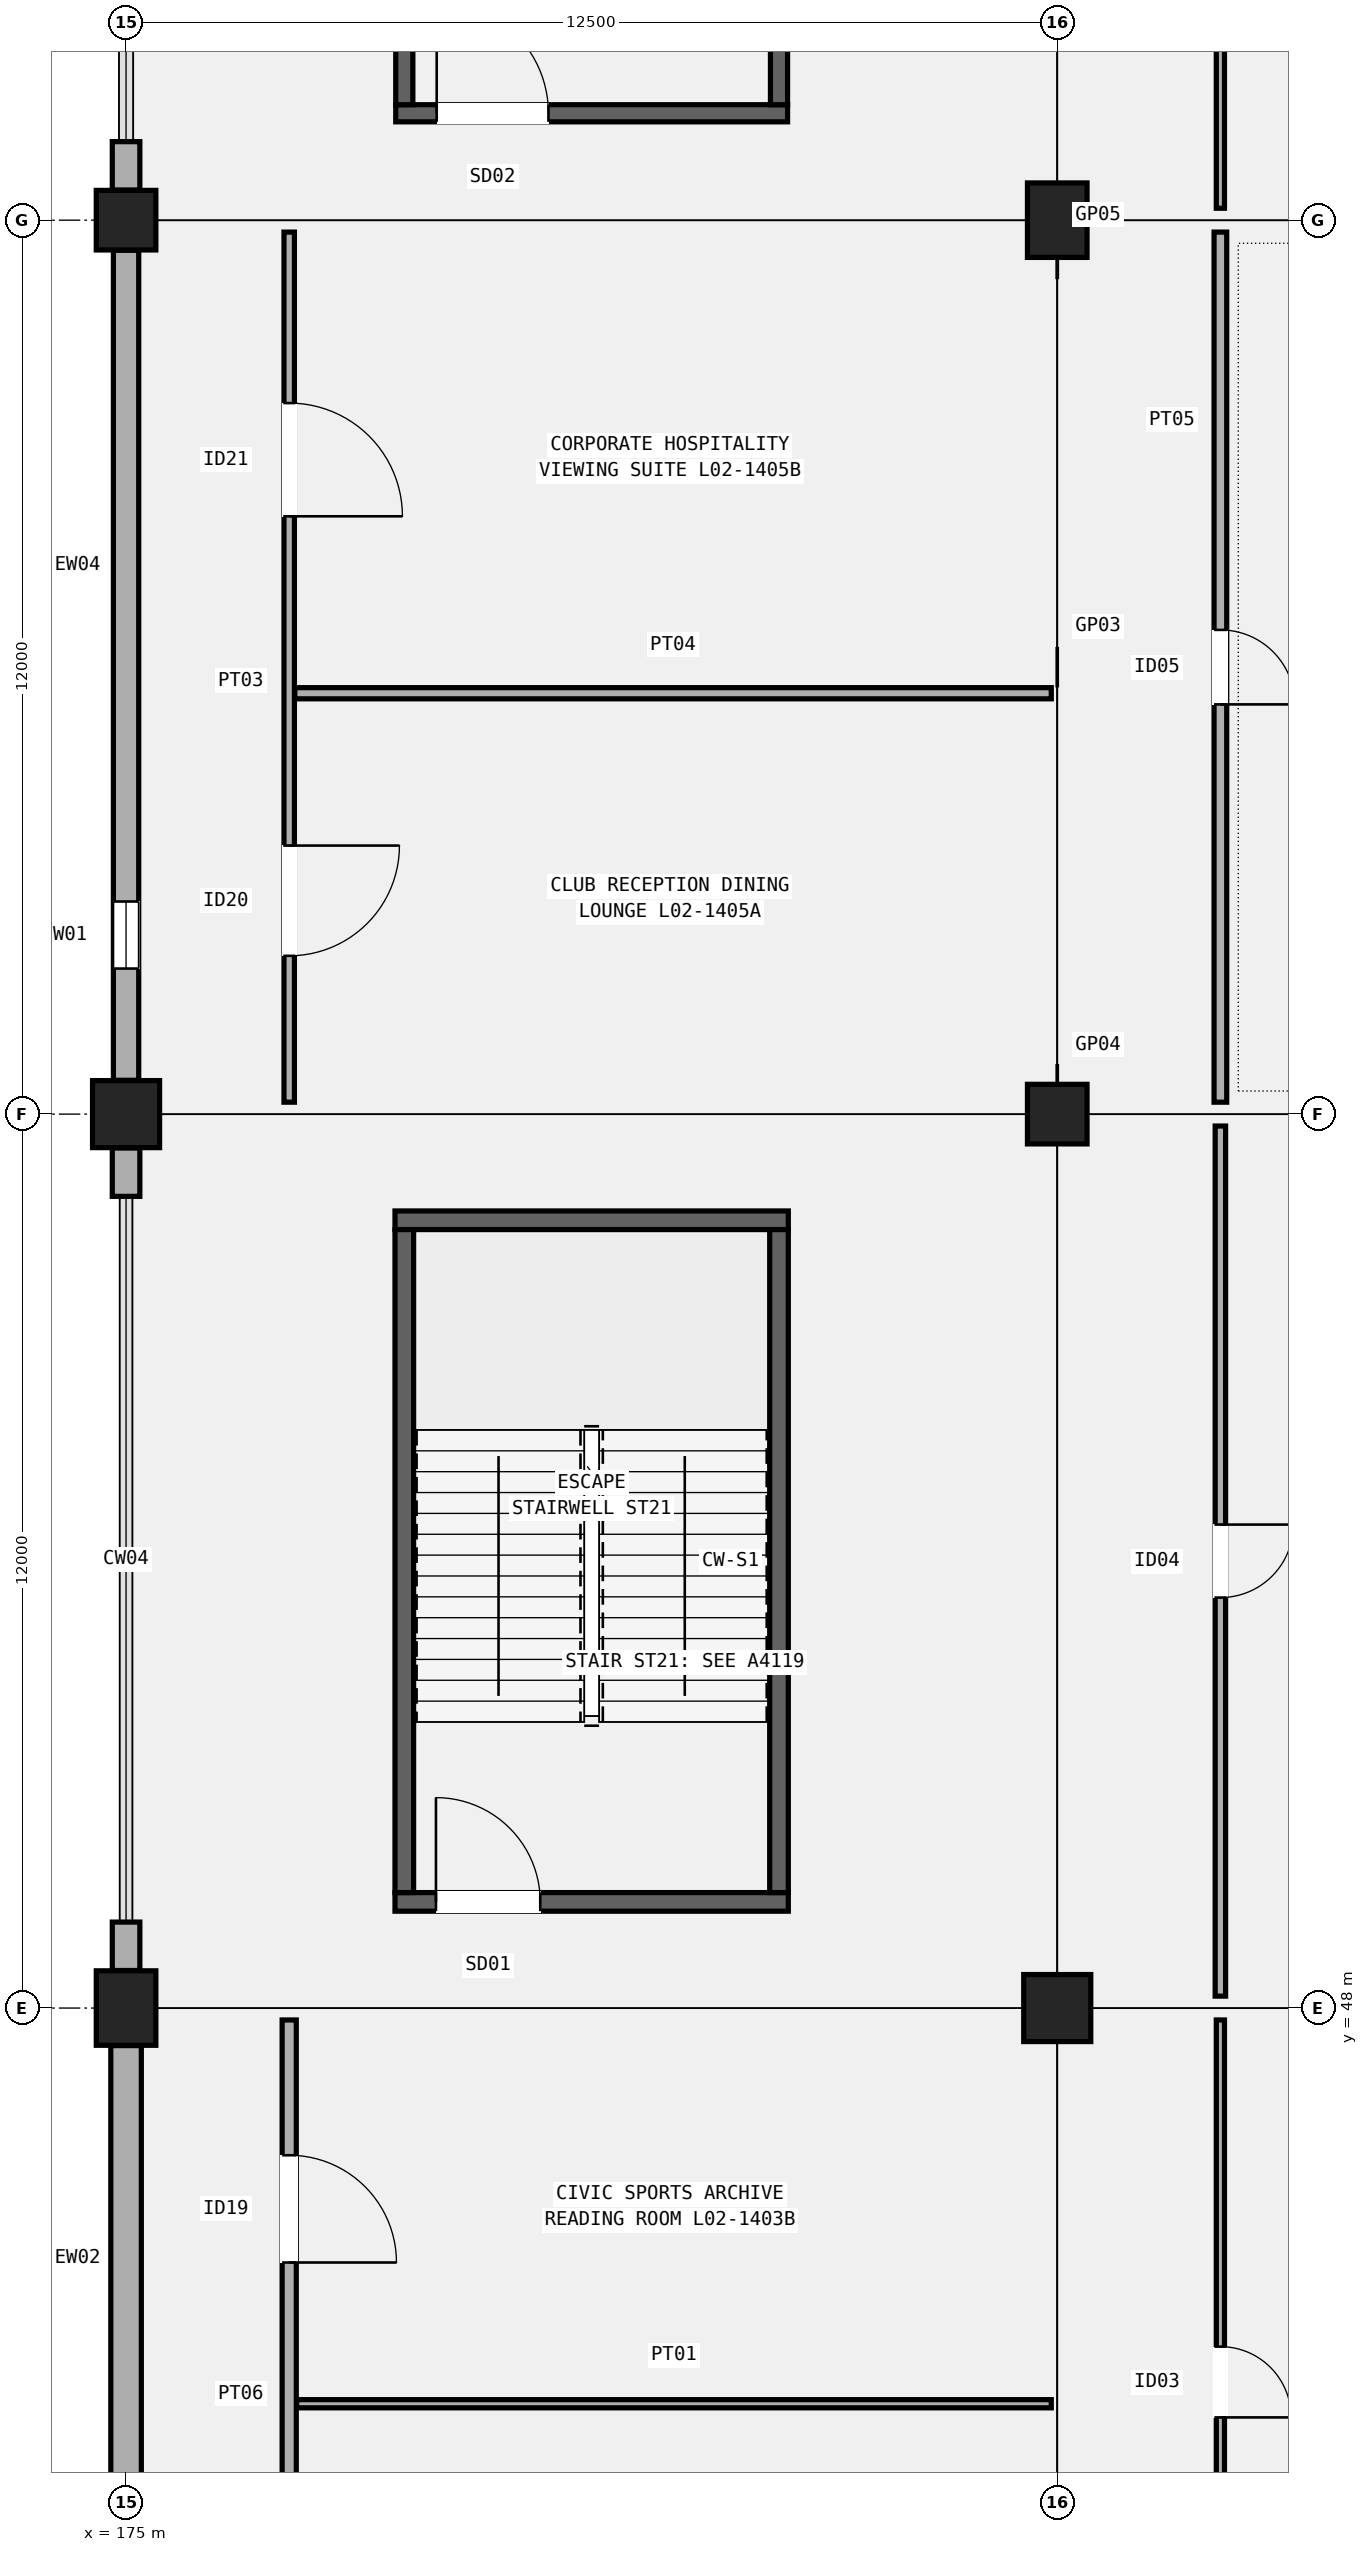
"""IFC4 building model, lengths in metres.
Left out: names, types, materials, properties, quantities, classifications, styles, units other than length and angle.
Written with IfcOpenShell. Run it as: python <this file> out.ifc"""

import sys

from ifc_helpers import new_model, si_unit, direction, frame, frame_2d, origin, origin_2d, place, context, subcontext, project, spatial, rectangle, extrude, element, fill, save


model = new_model("IFC4")
c1 = context("Model", 3, precision=1e-05, world=origin(), true_north=direction((0.0, 1.0)))
c2 = subcontext(c1, "Body", "Model", "MODEL_VIEW")
j1 = project(units=[si_unit("LENGTHUNIT", "METRE"), si_unit("PLANEANGLEUNIT", "RADIAN")], contexts=[c1])
p1 = place(None, origin())
s1 = spatial("IfcSite", under=j1, at=p1, CompositionType="ELEMENT")
p2 = place(p1, origin())
s2 = spatial("IfcBuilding", under=s1, at=p2, CompositionType="ELEMENT")
p3 = place(p2, frame((0.0, 0.0, 10.2)))
s3 = spatial("IfcBuildingStorey", under=s2, at=p3, CompositionType="ELEMENT", Elevation=10.2)
p4 = place(p3, frame((175.0, 48.0, 0.0), z_axis=(0.0, 0.0, 1.0), x_axis=(1.0, 0.0, 0.0)))
e1 = element("IfcColumn", 1, at=p4, inside=s3, PredefinedType="COLUMN", context=c2, shape_type="SweptSolid", body=[
    extrude(rectangle(XDim=0.8, YDim=1.0, at=origin_2d()), origin(), (0.0, 0.0, 1.0), 5.1),
])
p5 = place(p3, frame((175.0, 60.0, 0.0), z_axis=(0.0, 0.0, 1.0), x_axis=(1.0, 0.0, 0.0)))
e2 = element("IfcColumn", 2, at=p5, inside=s3, PredefinedType="COLUMN", context=c2, shape_type="SweptSolid", body=[
    extrude(rectangle(XDim=0.9, YDim=0.9, at=origin_2d()), origin(), (0.0, 0.0, 1.0), 5.1),
])
p6 = place(p3, frame((175.0, 72.0, 0.0), z_axis=(0.0, 0.0, 1.0), x_axis=(1.0, 0.0, 0.0)))
e3 = element("IfcColumn", 3, at=p6, inside=s3, PredefinedType="COLUMN", context=c2, shape_type="SweptSolid", body=[
    extrude(rectangle(XDim=0.8, YDim=0.8, at=origin_2d()), origin(), (0.0, 0.0, 1.0), 5.1),
])
p7 = place(p3, frame((187.5, 48.0, 0.0), z_axis=(0.0, 0.0, 1.0), x_axis=(1.0, 0.0, 0.0)))
e4 = element("IfcColumn", 4, at=p7, inside=s3, PredefinedType="COLUMN", context=c2, shape_type="SweptSolid", body=[
    extrude(rectangle(XDim=0.9, YDim=0.9, at=origin_2d()), origin(), (0.0, 0.0, 1.0), 5.1),
])
p8 = place(p3, frame((187.5, 60.0, 0.0), z_axis=(0.0, 0.0, 1.0), x_axis=(1.0, 0.0, 0.0)))
e5 = element("IfcColumn", 5, at=p8, inside=s3, PredefinedType="COLUMN", context=c2, shape_type="SweptSolid", body=[
    extrude(rectangle(XDim=0.8, YDim=0.8, at=origin_2d()), origin(), (0.0, 0.0, 1.0), 5.1),
])
p9 = place(p3, frame((187.5, 72.0, 0.0), z_axis=(0.0, 0.0, 1.0), x_axis=(1.0, 0.0, 0.0)))
e6 = element("IfcColumn", 6, at=p9, inside=s3, PredefinedType="COLUMN", context=c2, shape_type="SweptSolid", body=[
    extrude(rectangle(XDim=0.8, YDim=1.0, at=origin_2d()), origin(), (0.0, 0.0, 1.0), 5.1),
])
p10 = place(p3, frame((175.0, 36.404, 0.0), z_axis=(0.0, 0.0, 1.0), x_axis=(0.0, 1.0, 0.0)))
e7 = element("IfcWall", 7, at=p10, inside=s3, PredefinedType="SOLIDWALL", context=c2, shape_type="SweptSolid", body=[
    extrude(rectangle(XDim=11.092, YDim=0.41, at=frame_2d((5.546, 0.0))), origin(), (0.0, 0.0, 1.0), 4.232),
])
p11 = place(p10, frame((1.5, 0.0, 0.95)))
e8 = element("IfcOpeningElement", 8, at=p11, cuts=e7, PredefinedType="OPENING", context=c2, shape_type="SweptSolid", body=[
    extrude(rectangle(XDim=3.6, YDim=2.15, at=frame_2d((1.8, 1.075))), frame((0.0, 0.215, 0.0), z_axis=(0.0, -1.0, 0.0), x_axis=(1.0, 0.0, 0.0)), (0.0, 0.0, 1.0), 0.43),
])
p12 = place(p3, frame((175.0, 48.504, 0.0), z_axis=(0.0, 0.0, 1.0), x_axis=(0.0, 1.0, 0.0)))
e9 = element("IfcWall", 9, at=p12, inside=s3, PredefinedType="SOLIDWALL", context=c2, shape_type="SweptSolid", body=[
    extrude(rectangle(XDim=0.65, YDim=0.37, at=frame_2d((0.325, 0.0))), origin(), (0.0, 0.0, 1.0), 4.02),
])
p13 = place(p3, frame((175.0, 58.896, 0.0), z_axis=(0.0, 0.0, 1.0), x_axis=(0.0, 1.0, 0.0)))
e10 = element("IfcWall", 10, at=p13, inside=s3, PredefinedType="SOLIDWALL", context=c2, shape_type="SweptSolid", body=[
    extrude(rectangle(XDim=0.65, YDim=0.37, at=frame_2d((0.325, 0.0))), origin(), (0.0, 0.0, 1.0), 4.02),
])
p14 = place(p3, frame((175.0, 60.454, 0.0), z_axis=(0.0, 0.0, 1.0), x_axis=(0.0, 1.0, 0.0)))
e11 = element("IfcWall", 11, at=p14, inside=s3, PredefinedType="SOLIDWALL", context=c2, shape_type="SweptSolid", body=[
    extrude(rectangle(XDim=11.142, YDim=0.34, at=frame_2d((5.571, 0.0))), origin(), (0.0, 0.0, 1.0), 4.12),
])
p15 = place(p14, frame((1.5, 0.0, 0.95)))
e12 = element("IfcOpeningElement", 12, at=p15, cuts=e11, PredefinedType="OPENING", context=c2, shape_type="SweptSolid", body=[
    extrude(rectangle(XDim=0.9, YDim=2.1, at=frame_2d((0.45, 1.05))), frame((0.0, 0.18, 0.0), z_axis=(0.0, -1.0, 0.0), x_axis=(1.0, 0.0, 0.0)), (0.0, 0.0, 1.0), 0.36),
])
p16 = place(p3, frame((175.0, 72.404, 0.0), z_axis=(0.0, 0.0, 1.0), x_axis=(0.0, 1.0, 0.0)))
e13 = element("IfcWall", 13, at=p16, inside=s3, PredefinedType="SOLIDWALL", context=c2, shape_type="SweptSolid", body=[
    extrude(rectangle(XDim=0.65, YDim=0.37, at=frame_2d((0.325, 0.0))), origin(), (0.0, 0.0, 1.0), 4.232),
])
p17 = place(p3, frame((178.61, 49.425, 0.0), z_axis=(0.0, 0.0, 1.0), x_axis=(1.0, 0.0, 0.0)))
e14 = element("IfcWall", 14, at=p17, inside=s3, PredefinedType="SHEAR", context=c2, shape_type="SweptSolid", body=[
    extrude(rectangle(XDim=5.28, YDim=0.25, at=frame_2d((2.64, 0.0))), origin(), (0.0, 0.0, 1.0), 4.82),
])
p18 = place(p17, frame((0.55, 0.0, 0.0)))
e15 = element("IfcOpeningElement", 15, at=p18, cuts=e14, PredefinedType="OPENING", context=c2, shape_type="SweptSolid", body=[
    extrude(rectangle(XDim=1.4, YDim=2.15, at=frame_2d((0.7, 1.075))), frame((0.0, 0.135, 0.0), z_axis=(0.0, -1.0, 0.0), x_axis=(1.0, 0.0, 0.0)), (0.0, 0.0, 1.0), 0.27),
])
p19 = place(p3, frame((178.61, 58.575, 0.0), z_axis=(0.0, 0.0, 1.0), x_axis=(1.0, 0.0, 0.0)))
e16 = element("IfcWall", 16, at=p19, inside=s3, PredefinedType="SHEAR", context=c2, shape_type="SweptSolid", body=[
    extrude(rectangle(XDim=5.28, YDim=0.25, at=frame_2d((2.64, 0.0))), origin(), (0.0, 0.0, 1.0), 4.82),
])
for number, where, z_axis, x_axis in (
    (17, (178.735, 49.55, 0.0), (0.0, 0.0, 1.0), (0.0, 1.0, 0.0)),
    (18, (183.765, 49.55, 0.0), (0.0, 0.0, 1.0), (0.0, 1.0, 0.0)),
):
    element("IfcWall", number, at=place(p3, frame(where, z_axis=z_axis, x_axis=x_axis)), inside=s3, PredefinedType="SHEAR", context=c2, shape_type="SweptSolid", body=[
        extrude(rectangle(XDim=8.9, YDim=0.25, at=frame_2d((4.45, 0.0))), origin(), (0.0, 0.0, 1.0), 4.82),
    ])
p20 = place(p3, frame((178.62, 73.435, 0.0), z_axis=(0.0, 0.0, 1.0), x_axis=(1.0, 0.0, 0.0)))
e19 = element("IfcWall", 19, at=p20, inside=s3, PredefinedType="SHEAR", context=c2, shape_type="SweptSolid", body=[
    extrude(rectangle(XDim=5.26, YDim=0.23, at=frame_2d((2.63, 0.0))), origin(), (0.0, 0.0, 1.0), 4.82),
])
p21 = place(p20, frame((0.55, 0.0, 0.0)))
e20 = element("IfcOpeningElement", 20, at=p21, cuts=e19, PredefinedType="OPENING", context=c2, shape_type="SweptSolid", body=[
    extrude(rectangle(XDim=1.5, YDim=2.2, at=frame_2d((0.75, 1.1))), frame((0.0, 0.125, 0.0), z_axis=(0.0, -1.0, 0.0), x_axis=(1.0, 0.0, 0.0)), (0.0, 0.0, 1.0), 0.25),
])
for number, where, z_axis, x_axis in (
    (21, (178.735, 73.55, 0.0), (0.0, 0.0, 1.0), (0.0, 1.0, 0.0)),
    (22, (183.765, 73.55, 0.0), (0.0, 0.0, 1.0), (0.0, 1.0, 0.0)),
):
    element("IfcWall", number, at=place(p3, frame(where, z_axis=z_axis, x_axis=x_axis)), inside=s3, PredefinedType="SHEAR", context=c2, shape_type="SweptSolid", body=[
        extrude(rectangle(XDim=8.9, YDim=0.23, at=frame_2d((4.45, 0.0))), origin(), (0.0, 0.0, 1.0), 4.82),
    ])
p22 = place(p3, frame((177.19, 38.12, 0.0), z_axis=(0.0, 0.0, 1.0), x_axis=(0.0, 1.0, 0.0)))
e23 = element("IfcWall", 23, at=p22, inside=s3, PredefinedType="PARTITIONING", context=c2, shape_type="SweptSolid", body=[
    extrude(rectangle(XDim=9.72, YDim=0.19, at=frame_2d((4.86, 0.0))), origin(), (0.0, 0.0, 1.0), 4.22),
])
p23 = place(p22, frame((2.944, 0.0, 0.0), z_axis=(0.0, 0.0, 1.0), x_axis=(-1.0, 0.0, 0.0)))
e24 = element("IfcOpeningElement", 24, at=p23, cuts=e23, PredefinedType="OPENING", context=c2, shape_type="SweptSolid", body=[
    extrude(rectangle(XDim=1.4, YDim=2.24, at=frame_2d((0.7, 1.12))), frame((0.0, 0.105, 0.0), z_axis=(0.0, -1.0, 0.0), x_axis=(1.0, 0.0, 0.0)), (0.0, 0.0, 1.0), 0.21),
])
p24 = place(p22, frame((7.904, 0.0, 0.0), z_axis=(0.0, 0.0, 1.0), x_axis=(-1.0, 0.0, 0.0)))
e25 = element("IfcOpeningElement", 25, at=p24, cuts=e23, PredefinedType="OPENING", context=c2, shape_type="SweptSolid", body=[
    extrude(rectangle(XDim=1.44, YDim=2.26, at=frame_2d((0.72, 1.13))), frame((0.0, 0.105, 0.0), z_axis=(0.0, -1.0, 0.0), x_axis=(1.0, 0.0, 0.0)), (0.0, 0.0, 1.0), 0.21),
])
p25 = place(p3, frame((177.29, 42.688, 0.0), z_axis=(0.0, 0.0, 1.0), x_axis=(1.0, 0.0, 0.0)))
e26 = element("IfcWall", 26, at=p25, inside=s3, PredefinedType="PARTITIONING", context=c2, shape_type="SweptSolid", body=[
    extrude(rectangle(XDim=10.13, YDim=0.11, at=frame_2d((5.065, 0.0))), origin(), (0.0, 0.0, 1.0), 4.22),
])
p26 = place(p3, frame((177.19, 60.16, 0.0), z_axis=(0.0, 0.0, 1.0), x_axis=(0.0, 1.0, 0.0)))
e27 = element("IfcWall", 27, at=p26, inside=s3, PredefinedType="PARTITIONING", context=c2, shape_type="SweptSolid", body=[
    extrude(rectangle(XDim=11.68, YDim=0.14, at=frame_2d((5.84, 0.0))), origin(), (0.0, 0.0, 1.0), 4.22),
])
p27 = place(p26, frame((3.445, 0.0, 0.0), z_axis=(0.0, 0.0, 1.0), x_axis=(-1.0, 0.0, 0.0)))
e28 = element("IfcOpeningElement", 28, at=p27, cuts=e27, PredefinedType="OPENING", context=c2, shape_type="SweptSolid", body=[
    extrude(rectangle(XDim=1.48, YDim=2.24, at=frame_2d((0.74, 1.12))), frame((0.0, 0.08, 0.0), z_axis=(0.0, -1.0, 0.0), x_axis=(1.0, 0.0, 0.0)), (0.0, 0.0, 1.0), 0.16),
])
p28 = place(p26, frame((9.385, 0.0, 0.0), z_axis=(0.0, 0.0, 1.0), x_axis=(-1.0, 0.0, 0.0)))
e29 = element("IfcOpeningElement", 29, at=p28, cuts=e27, PredefinedType="OPENING", context=c2, shape_type="SweptSolid", body=[
    extrude(rectangle(XDim=1.52, YDim=2.28, at=frame_2d((0.76, 1.14))), frame((0.0, 0.08, 0.0), z_axis=(0.0, -1.0, 0.0), x_axis=(1.0, 0.0, 0.0)), (0.0, 0.0, 1.0), 0.16),
])
p29 = place(p3, frame((177.265, 65.65, 0.0), z_axis=(0.0, 0.0, 1.0), x_axis=(1.0, 0.0, 0.0)))
e30 = element("IfcWall", 30, at=p29, inside=s3, PredefinedType="PARTITIONING", context=c2, shape_type="SweptSolid", body=[
    extrude(rectangle(XDim=10.155, YDim=0.15, at=frame_2d((5.078, 0.0))), origin(), (0.0, 0.0, 1.0), 4.22),
])
p30 = place(p3, frame((189.69, 38.12, 0.0), z_axis=(0.0, 0.0, 1.0), x_axis=(0.0, 1.0, 0.0)))
e31 = element("IfcWall", 31, at=p30, inside=s3, PredefinedType="PARTITIONING", context=c2, shape_type="SweptSolid", body=[
    extrude(rectangle(XDim=9.72, YDim=0.11, at=frame_2d((4.86, 0.0))), origin(), (0.0, 0.0, 1.0), 4.22),
])
p31 = place(p30, frame((5.335, 0.0, 0.0), z_axis=(0.0, 0.0, 1.0), x_axis=(-1.0, 0.0, 0.0)))
e32 = element("IfcOpeningElement", 32, at=p31, cuts=e31, PredefinedType="OPENING", context=c2, shape_type="SweptSolid", body=[
    extrude(rectangle(XDim=0.95, YDim=2.12, at=frame_2d((0.475, 1.06))), frame((0.0, 0.065, 0.0), z_axis=(0.0, -1.0, 0.0), x_axis=(1.0, 0.0, 0.0)), (0.0, 0.0, 1.0), 0.13),
])
p32 = place(p3, frame((189.69, 48.16, 0.0), z_axis=(0.0, 0.0, 1.0), x_axis=(0.0, 1.0, 0.0)))
e33 = element("IfcWall", 33, at=p32, inside=s3, PredefinedType="PARTITIONING", context=c2, shape_type="SweptSolid", body=[
    extrude(rectangle(XDim=11.68, YDim=0.14, at=frame_2d((5.84, 0.0))), origin(), (0.0, 0.0, 1.0), 4.22),
])
p33 = place(p32, frame((6.33, 0.0, 0.0), z_axis=(0.0, 0.0, 1.0), x_axis=(-1.0, 0.0, 0.0)))
e34 = element("IfcOpeningElement", 34, at=p33, cuts=e33, PredefinedType="OPENING", context=c2, shape_type="SweptSolid", body=[
    extrude(rectangle(XDim=0.98, YDim=2.1, at=frame_2d((0.49, 1.05))), frame((0.0, 0.08, 0.0), z_axis=(0.0, -1.0, 0.0), x_axis=(1.0, 0.0, 0.0)), (0.0, 0.0, 1.0), 0.16),
])
p34 = place(p3, frame((189.69, 60.16, 0.0), z_axis=(0.0, 0.0, 1.0), x_axis=(0.0, 1.0, 0.0)))
e35 = element("IfcWall", 35, at=p34, inside=s3, PredefinedType="PARTITIONING", context=c2, shape_type="SweptSolid", body=[
    extrude(rectangle(XDim=11.68, YDim=0.17, at=frame_2d((5.84, 0.0))), origin(), (0.0, 0.0, 1.0), 4.22),
])
p35 = place(p34, frame((6.34, 0.0, 0.0), z_axis=(0.0, 0.0, 1.0), x_axis=(-1.0, 0.0, 0.0)))
e36 = element("IfcOpeningElement", 36, at=p35, cuts=e35, PredefinedType="OPENING", context=c2, shape_type="SweptSolid", body=[
    extrude(rectangle(XDim=1.0, YDim=2.14, at=frame_2d((0.5, 1.07))), frame((0.0, 0.095, 0.0), z_axis=(0.0, -1.0, 0.0), x_axis=(1.0, 0.0, 0.0)), (0.0, 0.0, 1.0), 0.19),
])
p36 = place(p3, frame((189.69, 72.16, 0.0), z_axis=(0.0, 0.0, 1.0), x_axis=(0.0, 1.0, 0.0)))
e37 = element("IfcWall", 37, at=p36, inside=s3, PredefinedType="PARTITIONING", context=c2, shape_type="SweptSolid", body=[
    extrude(rectangle(XDim=11.68, YDim=0.11, at=frame_2d((5.84, 0.0))), origin(), (0.0, 0.0, 1.0), 4.22),
])
p37 = place(p36, frame((6.355, 0.0, 0.0), z_axis=(0.0, 0.0, 1.0), x_axis=(-1.0, 0.0, 0.0)))
e38 = element("IfcOpeningElement", 38, at=p37, cuts=e37, PredefinedType="OPENING", context=c2, shape_type="SweptSolid", body=[
    extrude(rectangle(XDim=1.03, YDim=2.12, at=frame_2d((0.515, 1.06))), frame((0.0, 0.065, 0.0), z_axis=(0.0, -1.0, 0.0), x_axis=(1.0, 0.0, 0.0)), (0.0, 0.0, 1.0), 0.13),
])
p38 = place(p15, origin())
e39 = element("IfcWindow", 39, at=p38, inside=s3, PartitioningType="SINGLE_PANEL", PredefinedType="WINDOW", context=c2, shape_type="SweptSolid", body=[
    extrude(rectangle(XDim=0.9, YDim=2.1, at=frame_2d((0.45, 1.05))), frame((0.0, 0.03, 0.0), z_axis=(0.0, -1.0, 0.0), x_axis=(1.0, 0.0, 0.0)), (0.0, 0.0, 1.0), 0.06),
])
fill(e12, e39)
p39 = place(p18, origin())
e40 = element("IfcDoor", 40, at=p39, inside=s3, OperationType="SINGLE_SWING_LEFT", PredefinedType="DOOR", context=c2, shape_type="SweptSolid", body=[
    extrude(rectangle(XDim=1.4, YDim=2.15, at=frame_2d((0.7, 1.075))), frame((0.0, 0.025, 0.0), z_axis=(0.0, -1.0, 0.0), x_axis=(1.0, 0.0, 0.0)), (0.0, 0.0, 1.0), 0.05),
])
fill(e15, e40)
p40 = place(p21, origin())
e41 = element("IfcDoor", 41, at=p40, inside=s3, OperationType="SINGLE_SWING_LEFT", PredefinedType="DOOR", context=c2, shape_type="SweptSolid", body=[
    extrude(rectangle(XDim=1.5, YDim=2.2, at=frame_2d((0.75, 1.1))), frame((0.0, 0.025, 0.0), z_axis=(0.0, -1.0, 0.0), x_axis=(1.0, 0.0, 0.0)), (0.0, 0.0, 1.0), 0.05),
])
fill(e20, e41)
p41 = place(p24, origin())
e42 = element("IfcDoor", 42, at=p41, inside=s3, OperationType="SINGLE_SWING_RIGHT", PredefinedType="DOOR", context=c2, shape_type="SweptSolid", body=[
    extrude(rectangle(XDim=1.44, YDim=2.26, at=frame_2d((0.72, 1.13))), frame((0.0, 0.025, 0.0), z_axis=(0.0, -1.0, 0.0), x_axis=(1.0, 0.0, 0.0)), (0.0, 0.0, 1.0), 0.05),
])
fill(e25, e42)
p42 = place(p27, origin())
e43 = element("IfcDoor", 43, at=p42, inside=s3, OperationType="SINGLE_SWING_LEFT", PredefinedType="DOOR", context=c2, shape_type="SweptSolid", body=[
    extrude(rectangle(XDim=1.48, YDim=2.24, at=frame_2d((0.74, 1.12))), frame((0.0, 0.025, 0.0), z_axis=(0.0, -1.0, 0.0), x_axis=(1.0, 0.0, 0.0)), (0.0, 0.0, 1.0), 0.05),
])
fill(e28, e43)
p43 = place(p28, origin())
e44 = element("IfcDoor", 44, at=p43, inside=s3, OperationType="SINGLE_SWING_RIGHT", PredefinedType="DOOR", context=c2, shape_type="SweptSolid", body=[
    extrude(rectangle(XDim=1.52, YDim=2.28, at=frame_2d((0.76, 1.14))), frame((0.0, 0.025, 0.0), z_axis=(0.0, -1.0, 0.0), x_axis=(1.0, 0.0, 0.0)), (0.0, 0.0, 1.0), 0.05),
])
fill(e29, e44)
p44 = place(p31, origin())
e45 = element("IfcDoor", 45, at=p44, inside=s3, OperationType="SINGLE_SWING_RIGHT", PredefinedType="DOOR", context=c2, shape_type="SweptSolid", body=[
    extrude(rectangle(XDim=0.95, YDim=2.12, at=frame_2d((0.475, 1.06))), frame((0.0, 0.025, 0.0), z_axis=(0.0, -1.0, 0.0), x_axis=(1.0, 0.0, 0.0)), (0.0, 0.0, 1.0), 0.05),
])
fill(e32, e45)
p45 = place(p33, origin())
e46 = element("IfcDoor", 46, at=p45, inside=s3, OperationType="SINGLE_SWING_LEFT", PredefinedType="DOOR", context=c2, shape_type="SweptSolid", body=[
    extrude(rectangle(XDim=0.98, YDim=2.1, at=frame_2d((0.49, 1.05))), frame((0.0, 0.025, 0.0), z_axis=(0.0, -1.0, 0.0), x_axis=(1.0, 0.0, 0.0)), (0.0, 0.0, 1.0), 0.05),
])
fill(e34, e46)
p46 = place(p35, origin())
e47 = element("IfcDoor", 47, at=p46, inside=s3, OperationType="SINGLE_SWING_RIGHT", PredefinedType="DOOR", context=c2, shape_type="SweptSolid", body=[
    extrude(rectangle(XDim=1.0, YDim=2.14, at=frame_2d((0.5, 1.07))), frame((0.0, 0.025, 0.0), z_axis=(0.0, -1.0, 0.0), x_axis=(1.0, 0.0, 0.0)), (0.0, 0.0, 1.0), 0.05),
])
fill(e36, e47)
save(model, sys.argv[1])
